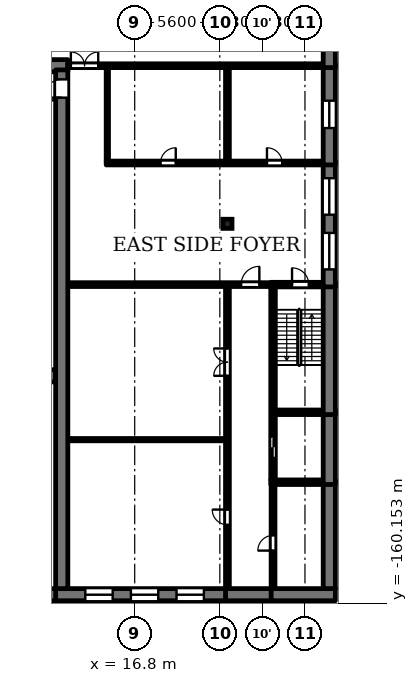
"""IFC4 building model, lengths in metres.
Left out: names, types, materials, properties, quantities, classifications, styles, units other than length and angle.
Written with IfcOpenShell. Run it as: python <this file> out.ifc"""

import sys

from ifc_helpers import new_model, si_unit, direction, frame, frame_2d, origin, origin_2d, place, context, subcontext, project, spatial, rectangle, extrude, element, fill, save


model = new_model("IFC4")
c1 = context("Model", 3, precision=1e-05, world=origin(), true_north=direction((0.0, 1.0)))
c2 = subcontext(c1, "Body", "Model", "MODEL_VIEW")
j1 = project(units=[si_unit("LENGTHUNIT", "METRE"), si_unit("PLANEANGLEUNIT", "RADIAN")], contexts=[c1])
p1 = place(None, origin())
s1 = spatial("IfcSite", under=j1, at=p1, CompositionType="ELEMENT")
p2 = place(p1, origin())
s2 = spatial("IfcBuilding", under=s1, at=p2, CompositionType="ELEMENT")
p3 = place(p2, frame((0.0, 0.0, 11.3)))
s3 = spatial("IfcBuildingStorey", under=s2, at=p3, CompositionType="ELEMENT", Elevation=11.3)
p4 = place(p3, frame((22.9, -135.2, 0.0), z_axis=(0.0, 0.0, 1.0), x_axis=(1.0, 0.0, 0.0)))
e1 = element("IfcColumn", 1, at=p4, inside=s3, PredefinedType="COLUMN", context=c2, shape_type="SweptSolid", body=[
    extrude(rectangle(XDim=0.6, YDim=0.6, at=origin_2d()), origin(), (0.0, 0.0, 1.0), 4.45),
])
p5 = place(p3, frame((-12.4, -159.6, 0.0), z_axis=(0.0, 0.0, 1.0), x_axis=(1.0, 0.0, 0.0)))
e2 = element("IfcWall", 2, at=p5, inside=s3, PredefinedType="SOLIDWALL", context=c2, shape_type="SweptSolid", body=[
    extrude(rectangle(XDim=24.8, YDim=0.8, at=frame_2d((12.4, 0.0))), origin(), (0.0, 0.0, 1.0), 4.8),
])
p6 = place(p3, frame((11.6, -159.6, 0.0), z_axis=(0.0, 0.0, 1.0), x_axis=(1.0, 0.0, 0.0)))
e3 = element("IfcWall", 3, at=p6, inside=s3, PredefinedType="SOLIDWALL", context=c2, shape_type="SweptSolid", body=[
    extrude(rectangle(XDim=11.425, YDim=0.8, at=frame_2d((5.712, 0.0))), origin(), (0.0, 0.0, 1.0), 4.45),
])
p7 = place(p6, frame((1.95, 0.0, 0.9)))
e4 = element("IfcOpeningElement", 4, at=p7, cuts=e3, PredefinedType="OPENING", context=c2, shape_type="SweptSolid", body=[
    extrude(rectangle(XDim=1.8, YDim=1.5, at=frame_2d((0.9, 0.75))), frame((0.0, 0.41, 0.0), z_axis=(0.0, -1.0, 0.0), x_axis=(1.0, 0.0, 0.0)), (0.0, 0.0, 1.0), 0.82),
])
p8 = place(p6, frame((4.95, 0.0, 0.9)))
e5 = element("IfcOpeningElement", 5, at=p8, cuts=e3, PredefinedType="OPENING", context=c2, shape_type="SweptSolid", body=[
    extrude(rectangle(XDim=1.8, YDim=1.5, at=frame_2d((0.9, 0.75))), frame((0.0, 0.41, 0.0), z_axis=(0.0, -1.0, 0.0), x_axis=(1.0, 0.0, 0.0)), (0.0, 0.0, 1.0), 0.82),
])
p9 = place(p6, frame((7.95, 0.0, 0.9)))
e6 = element("IfcOpeningElement", 6, at=p9, cuts=e3, PredefinedType="OPENING", context=c2, shape_type="SweptSolid", body=[
    extrude(rectangle(XDim=1.8, YDim=1.5, at=frame_2d((0.9, 0.75))), frame((0.0, 0.41, 0.0), z_axis=(0.0, -1.0, 0.0), x_axis=(1.0, 0.0, 0.0)), (0.0, 0.0, 1.0), 0.82),
])
p10 = place(p3, frame((22.775, -159.6, 0.0), z_axis=(0.0, 0.0, 1.0), x_axis=(1.0, 0.0, 0.0)))
e7 = element("IfcWall", 7, at=p10, inside=s3, PredefinedType="SOLIDWALL", context=c2, shape_type="SweptSolid", body=[
    extrude(rectangle(XDim=3.25, YDim=0.8, at=frame_2d((1.625, 0.0))), origin(), (0.0, 0.0, 1.0), 4.45),
])
p11 = place(p3, frame((25.775, -159.6, 0.0), z_axis=(0.0, 0.0, 1.0), x_axis=(1.0, 0.0, 0.0)))
e8 = element("IfcWall", 8, at=p11, inside=s3, PredefinedType="SOLIDWALL", context=c2, shape_type="SweptSolid", body=[
    extrude(rectangle(XDim=4.225, YDim=0.8, at=frame_2d((2.112, 0.0))), origin(), (0.0, 0.0, 1.0), 4.45),
])
p12 = place(p3, frame((25.75, -152.2, 0.0), z_axis=(0.0, 0.0, 1.0), x_axis=(1.0, 0.0, 0.0)))
e9 = element("IfcWall", 9, at=p12, inside=s3, PredefinedType="SOLIDWALL", context=c2, shape_type="SweptSolid", body=[
    extrude(rectangle(XDim=3.45, YDim=0.3, at=frame_2d((1.725, 0.0))), origin(), (0.0, 0.0, 1.0), 4.45),
])
p13 = place(p3, frame((12.4, -149.4, 0.0), z_axis=(0.0, 0.0, 1.0), x_axis=(1.0, 0.0, 0.0)))
e10 = element("IfcWall", 10, at=p13, inside=s3, PredefinedType="PARTITIONING", context=c2, shape_type="SweptSolid", body=[
    extrude(rectangle(XDim=10.375, YDim=0.15, at=frame_2d((5.188, 0.0))), origin(), (0.0, 0.0, 1.0), 4.45),
])
p14 = place(p3, frame((26.05, -147.6, 0.0), z_axis=(0.0, 0.0, 1.0), x_axis=(1.0, 0.0, 0.0)))
e11 = element("IfcWall", 11, at=p14, inside=s3, PredefinedType="SOLIDWALL", context=c2, shape_type="SweptSolid", body=[
    extrude(rectangle(XDim=3.15, YDim=0.3, at=frame_2d((1.575, 0.0))), origin(), (0.0, 0.0, 1.0), 4.45),
])
p15 = place(p3, frame((-11.6, -145.2, 0.0), z_axis=(0.0, 0.0, 1.0), x_axis=(1.0, 0.0, 0.0)))
e12 = element("IfcWall", 12, at=p15, inside=s3, PredefinedType="SOLIDWALL", context=c2, shape_type="SweptSolid", body=[
    extrude(rectangle(XDim=23.2, YDim=0.8, at=frame_2d((11.6, 0.0))), origin(), (0.0, 0.0, 1.0), 4.8),
])
p16 = place(p3, frame((12.4, -139.2, 0.0), z_axis=(0.0, 0.0, 1.0), x_axis=(1.0, 0.0, 0.0)))
e13 = element("IfcWall", 13, at=p16, inside=s3, PredefinedType="SOLIDWALL", context=c2, shape_type="SweptSolid", body=[
    extrude(rectangle(XDim=13.35, YDim=0.25, at=frame_2d((6.675, 0.0))), origin(), (0.0, 0.0, 1.0), 4.45),
])
p17 = place(p16, frame((11.4, 0.0, 0.0)))
e14 = element("IfcOpeningElement", 14, at=p17, cuts=e13, PredefinedType="OPENING", context=c2, shape_type="SweptSolid", body=[
    extrude(rectangle(XDim=1.2, YDim=2.1, at=frame_2d((0.6, 1.05))), frame((0.0, 0.135, 0.0), z_axis=(0.0, -1.0, 0.0), x_axis=(1.0, 0.0, 0.0)), (0.0, 0.0, 1.0), 0.27),
])
p18 = place(p3, frame((25.75, -139.2, 0.0), z_axis=(0.0, 0.0, 1.0), x_axis=(1.0, 0.0, 0.0)))
e15 = element("IfcWall", 15, at=p18, inside=s3, PredefinedType="SOLIDWALL", context=c2, shape_type="SweptSolid", body=[
    extrude(rectangle(XDim=3.45, YDim=0.3, at=frame_2d((1.725, 0.0))), origin(), (0.0, 0.0, 1.0), 4.45),
])
p19 = place(p18, frame((1.4, 0.0, 0.0)))
e16 = element("IfcOpeningElement", 16, at=p19, cuts=e15, PredefinedType="OPENING", context=c2, shape_type="SweptSolid", body=[
    extrude(rectangle(XDim=1.1, YDim=2.1, at=frame_2d((0.55, 1.05))), frame((0.0, 0.16, 0.0), z_axis=(0.0, -1.0, 0.0), x_axis=(1.0, 0.0, 0.0)), (0.0, 0.0, 1.0), 0.32),
])
p20 = place(p3, frame((14.925, -131.2, 0.0), z_axis=(0.0, 0.0, 1.0), x_axis=(1.0, 0.0, 0.0)))
e17 = element("IfcWall", 17, at=p20, inside=s3, PredefinedType="SOLIDWALL", context=c2, shape_type="SweptSolid", body=[
    extrude(rectangle(XDim=14.275, YDim=0.25, at=frame_2d((7.137, 0.0))), origin(), (0.0, 0.0, 1.0), 4.45),
])
p21 = place(p20, frame((3.575, 0.0, 0.0)))
e18 = element("IfcOpeningElement", 18, at=p21, cuts=e17, PredefinedType="OPENING", context=c2, shape_type="SweptSolid", body=[
    extrude(rectangle(XDim=1.0, YDim=2.1, at=frame_2d((0.5, 1.05))), frame((0.0, 0.135, 0.0), z_axis=(0.0, -1.0, 0.0), x_axis=(1.0, 0.0, 0.0)), (0.0, 0.0, 1.0), 0.27),
])
p22 = place(p20, frame((10.575, 0.0, 0.0)))
e19 = element("IfcOpeningElement", 19, at=p22, cuts=e17, PredefinedType="OPENING", context=c2, shape_type="SweptSolid", body=[
    extrude(rectangle(XDim=1.0, YDim=2.1, at=frame_2d((0.5, 1.05))), frame((0.0, 0.135, 0.0), z_axis=(0.0, -1.0, 0.0), x_axis=(1.0, 0.0, 0.0)), (0.0, 0.0, 1.0), 0.27),
])
p23 = place(p3, frame((-12.4, -124.8, 0.0), z_axis=(0.0, 0.0, 1.0), x_axis=(1.0, 0.0, 0.0)))
e20 = element("IfcWall", 20, at=p23, inside=s3, PredefinedType="SOLIDWALL", context=c2, shape_type="SweptSolid", body=[
    extrude(rectangle(XDim=24.8, YDim=0.8, at=frame_2d((12.4, 0.0))), origin(), (0.0, 0.0, 1.0), 4.8),
])
p24 = place(p23, frame((5.5, 0.0, 0.0)))
e21 = element("IfcOpeningElement", 21, at=p24, cuts=e20, PredefinedType="OPENING", context=c2, shape_type="SweptSolid", body=[
    extrude(rectangle(XDim=1.8, YDim=2.2, at=frame_2d((0.9, 1.1))), frame((0.0, 0.41, 0.0), z_axis=(0.0, -1.0, 0.0), x_axis=(1.0, 0.0, 0.0)), (0.0, 0.0, 1.0), 0.82),
])
p25 = place(p23, frame((17.5, 0.0, 0.0)))
e22 = element("IfcOpeningElement", 22, at=p25, cuts=e20, PredefinedType="OPENING", context=c2, shape_type="SweptSolid", body=[
    extrude(rectangle(XDim=1.8, YDim=2.2, at=frame_2d((0.9, 1.1))), frame((0.0, 0.41, 0.0), z_axis=(0.0, -1.0, 0.0), x_axis=(1.0, 0.0, 0.0)), (0.0, 0.0, 1.0), 0.82),
])
p26 = place(p3, frame((12.4, -124.8, 0.0), z_axis=(0.0, 0.0, 1.0), x_axis=(1.0, 0.0, 0.0)))
e23 = element("IfcWall", 23, at=p26, inside=s3, PredefinedType="SOLIDWALL", context=c2, shape_type="SweptSolid", body=[
    extrude(rectangle(XDim=16.8, YDim=0.25, at=frame_2d((8.4, 0.0))), origin(), (0.0, 0.0, 1.0), 4.45),
])
p27 = place(p26, frame((0.2, 0.0, 0.0)))
e24 = element("IfcOpeningElement", 24, at=p27, cuts=e23, PredefinedType="OPENING", context=c2, shape_type="SweptSolid", body=[
    extrude(rectangle(XDim=1.8, YDim=2.1, at=frame_2d((0.9, 1.05))), frame((0.0, 0.135, 0.0), z_axis=(0.0, -1.0, 0.0), x_axis=(1.0, 0.0, 0.0)), (0.0, 0.0, 1.0), 0.27),
])
p28 = place(p3, frame((12.0, -159.2, 0.0), z_axis=(0.0, 0.0, 1.0), x_axis=(0.0, 1.0, 0.0)))
e25 = element("IfcWall", 25, at=p28, inside=s3, PredefinedType="SOLIDWALL", context=c2, shape_type="SweptSolid", body=[
    extrude(rectangle(XDim=34.125, YDim=0.8, at=frame_2d((17.062, 0.0))), origin(), (0.0, 0.0, 1.0), 4.8),
])
p29 = place(p28, frame((32.3, 0.0, 0.0)))
e26 = element("IfcOpeningElement", 26, at=p29, cuts=e25, PredefinedType="OPENING", context=c2, shape_type="SweptSolid", body=[
    extrude(rectangle(XDim=1.2, YDim=2.1, at=frame_2d((0.6, 1.05))), frame((0.0, 0.41, 0.0), z_axis=(0.0, -1.0, 0.0), x_axis=(1.0, 0.0, 0.0)), (0.0, 0.0, 1.0), 0.82),
])
p30 = place(p3, frame((15.0, -131.075, 0.0), z_axis=(0.0, 0.0, 1.0), x_axis=(0.0, 1.0, 0.0)))
e27 = element("IfcWall", 27, at=p30, inside=s3, PredefinedType="PARTITIONING", context=c2, shape_type="SweptSolid", body=[
    extrude(rectangle(XDim=6.15, YDim=0.15, at=frame_2d((3.075, 0.0))), origin(), (0.0, 0.0, 1.0), 4.45),
])
p31 = place(p3, frame((22.9, -159.2, 0.0), z_axis=(0.0, 0.0, 1.0), x_axis=(0.0, 1.0, 0.0)))
e28 = element("IfcWall", 28, at=p31, inside=s3, PredefinedType="SOLIDWALL", context=c2, shape_type="SweptSolid", body=[
    extrude(rectangle(XDim=19.875, YDim=0.25, at=frame_2d((9.938, 0.0))), origin(), (0.0, 0.0, 1.0), 4.45),
])
p32 = place(p31, frame((14.0, 0.0, 0.0)))
e29 = element("IfcOpeningElement", 29, at=p32, cuts=e28, PredefinedType="OPENING", context=c2, shape_type="SweptSolid", body=[
    extrude(rectangle(XDim=1.8, YDim=2.1, at=frame_2d((0.9, 1.05))), frame((0.0, 0.135, 0.0), z_axis=(0.0, -1.0, 0.0), x_axis=(1.0, 0.0, 0.0)), (0.0, 0.0, 1.0), 0.27),
])
p33 = place(p31, frame((4.2, 0.0, 0.0)))
e30 = element("IfcOpeningElement", 30, at=p33, cuts=e28, PredefinedType="OPENING", context=c2, shape_type="SweptSolid", body=[
    extrude(rectangle(XDim=1.0, YDim=2.1, at=frame_2d((0.5, 1.05))), frame((0.0, 0.135, 0.0), z_axis=(0.0, -1.0, 0.0), x_axis=(1.0, 0.0, 0.0)), (0.0, 0.0, 1.0), 0.27),
])
p34 = place(p3, frame((22.9, -131.075, 0.0), z_axis=(0.0, 0.0, 1.0), x_axis=(0.0, 1.0, 0.0)))
e31 = element("IfcWall", 31, at=p34, inside=s3, PredefinedType="SOLIDWALL", context=c2, shape_type="SweptSolid", body=[
    extrude(rectangle(XDim=6.15, YDim=0.25, at=frame_2d((3.075, 0.0))), origin(), (0.0, 0.0, 1.0), 4.45),
])
p35 = place(p3, frame((25.9, -159.2, 0.0), z_axis=(0.0, 0.0, 1.0), x_axis=(0.0, 1.0, 0.0)))
e32 = element("IfcWall", 32, at=p35, inside=s3, PredefinedType="SOLIDWALL", context=c2, shape_type="SweptSolid", body=[
    extrude(rectangle(XDim=6.85, YDim=0.25, at=frame_2d((3.425, 0.0))), origin(), (0.0, 0.0, 1.0), 4.45),
])
p36 = place(p35, frame((2.5, 0.0, 0.0)))
e33 = element("IfcOpeningElement", 33, at=p36, cuts=e32, PredefinedType="OPENING", context=c2, shape_type="SweptSolid", body=[
    extrude(rectangle(XDim=1.0, YDim=2.1, at=frame_2d((0.5, 1.05))), frame((0.0, 0.135, 0.0), z_axis=(0.0, -1.0, 0.0), x_axis=(1.0, 0.0, 0.0)), (0.0, 0.0, 1.0), 0.27),
])
p37 = place(p3, frame((25.9, -152.05, 0.0), z_axis=(0.0, 0.0, 1.0), x_axis=(0.0, 1.0, 0.0)))
e34 = element("IfcWall", 34, at=p37, inside=s3, PredefinedType="SOLIDWALL", context=c2, shape_type="SweptSolid", body=[
    extrude(rectangle(XDim=12.825, YDim=0.3, at=frame_2d((6.413, 0.0))), origin(), (0.0, 0.0, 1.0), 4.45),
])
p38 = place(p37, frame((1.45, 0.0, 0.0)))
e35 = element("IfcOpeningElement", 35, at=p38, cuts=e34, PredefinedType="OPENING", context=c2, shape_type="SweptSolid", body=[
    extrude(rectangle(XDim=1.4, YDim=2.2, at=frame_2d((0.7, 1.1))), frame((0.0, 0.16, 0.0), z_axis=(0.0, -1.0, 0.0), x_axis=(1.0, 0.0, 0.0)), (0.0, 0.0, 1.0), 0.32),
])
p39 = place(p3, frame((29.6, -152.05, 0.0), z_axis=(0.0, 0.0, 1.0), x_axis=(0.0, -1.0, 0.0)))
e36 = element("IfcWall", 36, at=p39, inside=s3, PredefinedType="SOLIDWALL", context=c2, shape_type="SweptSolid", body=[
    extrude(rectangle(XDim=7.15, YDim=0.8, at=frame_2d((3.575, 0.0))), origin(), (0.0, 0.0, 1.0), 4.45),
])
p40 = place(p3, frame((29.6, -147.45, 0.0), z_axis=(0.0, 0.0, 1.0), x_axis=(0.0, -1.0, 0.0)))
e37 = element("IfcWall", 37, at=p40, inside=s3, PredefinedType="SOLIDWALL", context=c2, shape_type="SweptSolid", body=[
    extrude(rectangle(XDim=4.9, YDim=0.8, at=frame_2d((2.45, 0.0))), origin(), (0.0, 0.0, 1.0), 4.45),
])
p41 = place(p3, frame((29.6, -139.05, 0.0), z_axis=(0.0, 0.0, 1.0), x_axis=(0.0, -1.0, 0.0)))
e38 = element("IfcWall", 38, at=p41, inside=s3, PredefinedType="SOLIDWALL", context=c2, shape_type="SweptSolid", body=[
    extrude(rectangle(XDim=8.7, YDim=0.8, at=frame_2d((4.35, 0.0))), origin(), (0.0, 0.0, 1.0), 4.45),
])
p42 = place(p3, frame((29.6, -131.075, 0.0), z_axis=(0.0, 0.0, 1.0), x_axis=(0.0, -1.0, 0.0)))
e39 = element("IfcWall", 39, at=p42, inside=s3, PredefinedType="SOLIDWALL", context=c2, shape_type="SweptSolid", body=[
    extrude(rectangle(XDim=8.275, YDim=0.8, at=frame_2d((4.137, 0.0))), origin(), (0.0, 0.0, 1.0), 4.45),
])
p43 = place(p42, frame((4.725, 0.0, 0.6)))
e40 = element("IfcOpeningElement", 40, at=p43, cuts=e39, PredefinedType="OPENING", context=c2, shape_type="SweptSolid", body=[
    extrude(rectangle(XDim=2.4, YDim=3.2, at=frame_2d((1.2, 1.6))), frame((0.0, 0.41, 0.0), z_axis=(0.0, -1.0, 0.0), x_axis=(1.0, 0.0, 0.0)), (0.0, 0.0, 1.0), 0.82),
])
p44 = place(p42, frame((1.125, 0.0, 0.6)))
e41 = element("IfcOpeningElement", 41, at=p44, cuts=e39, PredefinedType="OPENING", context=c2, shape_type="SweptSolid", body=[
    extrude(rectangle(XDim=2.4, YDim=3.2, at=frame_2d((1.2, 1.6))), frame((0.0, 0.41, 0.0), z_axis=(0.0, -1.0, 0.0), x_axis=(1.0, 0.0, 0.0)), (0.0, 0.0, 1.0), 0.82),
])
p45 = place(p3, frame((29.6, -124.675, 0.0), z_axis=(0.0, 0.0, 1.0), x_axis=(0.0, -1.0, 0.0)))
e42 = element("IfcWall", 42, at=p45, inside=s3, PredefinedType="SOLIDWALL", context=c2, shape_type="SweptSolid", body=[
    extrude(rectangle(XDim=6.65, YDim=0.8, at=frame_2d((3.325, 0.0))), origin(), (0.0, 0.0, 1.0), 4.45),
])
p46 = place(p45, frame((2.425, 0.0, 0.9)))
e43 = element("IfcOpeningElement", 43, at=p46, cuts=e42, PredefinedType="OPENING", context=c2, shape_type="SweptSolid", body=[
    extrude(rectangle(XDim=1.8, YDim=1.5, at=frame_2d((0.9, 0.75))), frame((0.0, 0.41, 0.0), z_axis=(0.0, -1.0, 0.0), x_axis=(1.0, 0.0, 0.0)), (0.0, 0.0, 1.0), 0.82),
])
p47 = place(p3, frame((29.6, -121.05, 0.0), z_axis=(0.0, 0.0, 1.0), x_axis=(0.0, -1.0, 0.0)))
e44 = element("IfcWall", 44, at=p47, inside=s3, PredefinedType="SOLIDWALL", context=c2, shape_type="SweptSolid", body=[
    extrude(rectangle(XDim=3.875, YDim=0.8, at=frame_2d((1.938, 0.0))), origin(), (0.0, 0.0, 1.0), 4.45),
])
p48 = place(p43, origin())
e45 = element("IfcWindow", 45, at=p48, inside=s3, PartitioningType="SINGLE_PANEL", PredefinedType="WINDOW", context=c2, shape_type="SweptSolid", body=[
    extrude(rectangle(XDim=2.4, YDim=3.2, at=frame_2d((1.2, 1.6))), frame((0.0, 0.03, 0.0), z_axis=(0.0, -1.0, 0.0), x_axis=(1.0, 0.0, 0.0)), (0.0, 0.0, 1.0), 0.06),
])
fill(e40, e45)
p49 = place(p44, origin())
e46 = element("IfcWindow", 46, at=p49, inside=s3, PartitioningType="SINGLE_PANEL", PredefinedType="WINDOW", context=c2, shape_type="SweptSolid", body=[
    extrude(rectangle(XDim=2.4, YDim=3.2, at=frame_2d((1.2, 1.6))), frame((0.0, 0.03, 0.0), z_axis=(0.0, -1.0, 0.0), x_axis=(1.0, 0.0, 0.0)), (0.0, 0.0, 1.0), 0.06),
])
fill(e41, e46)
p50 = place(p46, origin())
e47 = element("IfcWindow", 47, at=p50, inside=s3, PartitioningType="SINGLE_PANEL", PredefinedType="WINDOW", context=c2, shape_type="SweptSolid", body=[
    extrude(rectangle(XDim=1.8, YDim=1.5, at=frame_2d((0.9, 0.75))), frame((0.0, 0.03, 0.0), z_axis=(0.0, -1.0, 0.0), x_axis=(1.0, 0.0, 0.0)), (0.0, 0.0, 1.0), 0.06),
])
fill(e43, e47)
p51 = place(p7, origin())
e48 = element("IfcWindow", 48, at=p51, inside=s3, PartitioningType="SINGLE_PANEL", PredefinedType="WINDOW", context=c2, shape_type="SweptSolid", body=[
    extrude(rectangle(XDim=1.8, YDim=1.5, at=frame_2d((0.9, 0.75))), frame((0.0, 0.03, 0.0), z_axis=(0.0, -1.0, 0.0), x_axis=(1.0, 0.0, 0.0)), (0.0, 0.0, 1.0), 0.06),
])
fill(e4, e48)
p52 = place(p8, origin())
e49 = element("IfcWindow", 49, at=p52, inside=s3, PartitioningType="SINGLE_PANEL", PredefinedType="WINDOW", context=c2, shape_type="SweptSolid", body=[
    extrude(rectangle(XDim=1.8, YDim=1.5, at=frame_2d((0.9, 0.75))), frame((0.0, 0.03, 0.0), z_axis=(0.0, -1.0, 0.0), x_axis=(1.0, 0.0, 0.0)), (0.0, 0.0, 1.0), 0.06),
])
fill(e5, e49)
p53 = place(p9, origin())
e50 = element("IfcWindow", 50, at=p53, inside=s3, PartitioningType="SINGLE_PANEL", PredefinedType="WINDOW", context=c2, shape_type="SweptSolid", body=[
    extrude(rectangle(XDim=1.8, YDim=1.5, at=frame_2d((0.9, 0.75))), frame((0.0, 0.03, 0.0), z_axis=(0.0, -1.0, 0.0), x_axis=(1.0, 0.0, 0.0)), (0.0, 0.0, 1.0), 0.06),
])
fill(e6, e50)
p54 = place(p38, origin())
e51 = element("IfcDoor", 51, at=p54, inside=s3, OperationType="DOUBLE_DOOR_SLIDING", PredefinedType="DOOR", context=c2, shape_type="SweptSolid", body=[
    extrude(rectangle(XDim=1.4, YDim=2.2, at=frame_2d((0.7, 1.1))), frame((0.0, 0.025, 0.0), z_axis=(0.0, -1.0, 0.0), x_axis=(1.0, 0.0, 0.0)), (0.0, 0.0, 1.0), 0.05),
])
fill(e35, e51)
p55 = place(p19, origin())
e52 = element("IfcDoor", 52, at=p55, inside=s3, OperationType="SINGLE_SWING_LEFT", PredefinedType="DOOR", context=c2, shape_type="SweptSolid", body=[
    extrude(rectangle(XDim=1.1, YDim=2.1, at=frame_2d((0.55, 1.05))), frame((0.0, 0.025, 0.0), z_axis=(0.0, -1.0, 0.0), x_axis=(1.0, 0.0, 0.0)), (0.0, 0.0, 1.0), 0.05),
])
fill(e16, e52)
p56 = place(p29, origin())
e53 = element("IfcDoor", 53, at=p56, inside=s3, OperationType="SINGLE_SWING_LEFT", PredefinedType="DOOR", context=c2, shape_type="SweptSolid", body=[
    extrude(rectangle(XDim=1.2, YDim=2.1, at=frame_2d((0.6, 1.05))), frame((0.0, 0.025, 0.0), z_axis=(0.0, -1.0, 0.0), x_axis=(1.0, 0.0, 0.0)), (0.0, 0.0, 1.0), 0.05),
])
fill(e26, e53)
p57 = place(p27, origin())
e54 = element("IfcDoor", 54, at=p57, inside=s3, OperationType="DOUBLE_DOOR_SINGLE_SWING", PredefinedType="DOOR", context=c2, shape_type="SweptSolid", body=[
    extrude(rectangle(XDim=1.8, YDim=2.1, at=frame_2d((0.9, 1.05))), frame((0.0, 0.025, 0.0), z_axis=(0.0, -1.0, 0.0), x_axis=(1.0, 0.0, 0.0)), (0.0, 0.0, 1.0), 0.05),
])
fill(e24, e54)
p58 = place(p17, origin())
e55 = element("IfcDoor", 55, at=p58, inside=s3, OperationType="SINGLE_SWING_RIGHT", PredefinedType="DOOR", context=c2, shape_type="SweptSolid", body=[
    extrude(rectangle(XDim=1.2, YDim=2.1, at=frame_2d((0.6, 1.05))), frame((0.0, 0.025, 0.0), z_axis=(0.0, -1.0, 0.0), x_axis=(1.0, 0.0, 0.0)), (0.0, 0.0, 1.0), 0.05),
])
fill(e14, e55)
p59 = place(p32, origin())
e56 = element("IfcDoor", 56, at=p59, inside=s3, OperationType="DOUBLE_DOOR_SINGLE_SWING", PredefinedType="DOOR", context=c2, shape_type="SweptSolid", body=[
    extrude(rectangle(XDim=1.8, YDim=2.1, at=frame_2d((0.9, 1.05))), frame((0.0, 0.025, 0.0), z_axis=(0.0, -1.0, 0.0), x_axis=(1.0, 0.0, 0.0)), (0.0, 0.0, 1.0), 0.05),
])
fill(e29, e56)
p60 = place(p33, origin())
e57 = element("IfcDoor", 57, at=p60, inside=s3, OperationType="SINGLE_SWING_RIGHT", PredefinedType="DOOR", context=c2, shape_type="SweptSolid", body=[
    extrude(rectangle(XDim=1.0, YDim=2.1, at=frame_2d((0.5, 1.05))), frame((0.0, 0.025, 0.0), z_axis=(0.0, -1.0, 0.0), x_axis=(1.0, 0.0, 0.0)), (0.0, 0.0, 1.0), 0.05),
])
fill(e30, e57)
p61 = place(p36, origin())
e58 = element("IfcDoor", 58, at=p61, inside=s3, OperationType="SINGLE_SWING_LEFT", PredefinedType="DOOR", context=c2, shape_type="SweptSolid", body=[
    extrude(rectangle(XDim=1.0, YDim=2.1, at=frame_2d((0.5, 1.05))), frame((0.0, 0.025, 0.0), z_axis=(0.0, -1.0, 0.0), x_axis=(1.0, 0.0, 0.0)), (0.0, 0.0, 1.0), 0.05),
])
fill(e33, e58)
p62 = place(p21, origin())
e59 = element("IfcDoor", 59, at=p62, inside=s3, OperationType="SINGLE_SWING_RIGHT", PredefinedType="DOOR", context=c2, shape_type="SweptSolid", body=[
    extrude(rectangle(XDim=1.0, YDim=2.1, at=frame_2d((0.5, 1.05))), frame((0.0, 0.025, 0.0), z_axis=(0.0, -1.0, 0.0), x_axis=(1.0, 0.0, 0.0)), (0.0, 0.0, 1.0), 0.05),
])
fill(e18, e59)
p63 = place(p22, origin())
e60 = element("IfcDoor", 60, at=p63, inside=s3, OperationType="SINGLE_SWING_LEFT", PredefinedType="DOOR", context=c2, shape_type="SweptSolid", body=[
    extrude(rectangle(XDim=1.0, YDim=2.1, at=frame_2d((0.5, 1.05))), frame((0.0, 0.025, 0.0), z_axis=(0.0, -1.0, 0.0), x_axis=(1.0, 0.0, 0.0)), (0.0, 0.0, 1.0), 0.05),
])
fill(e19, e60)
save(model, sys.argv[1])
